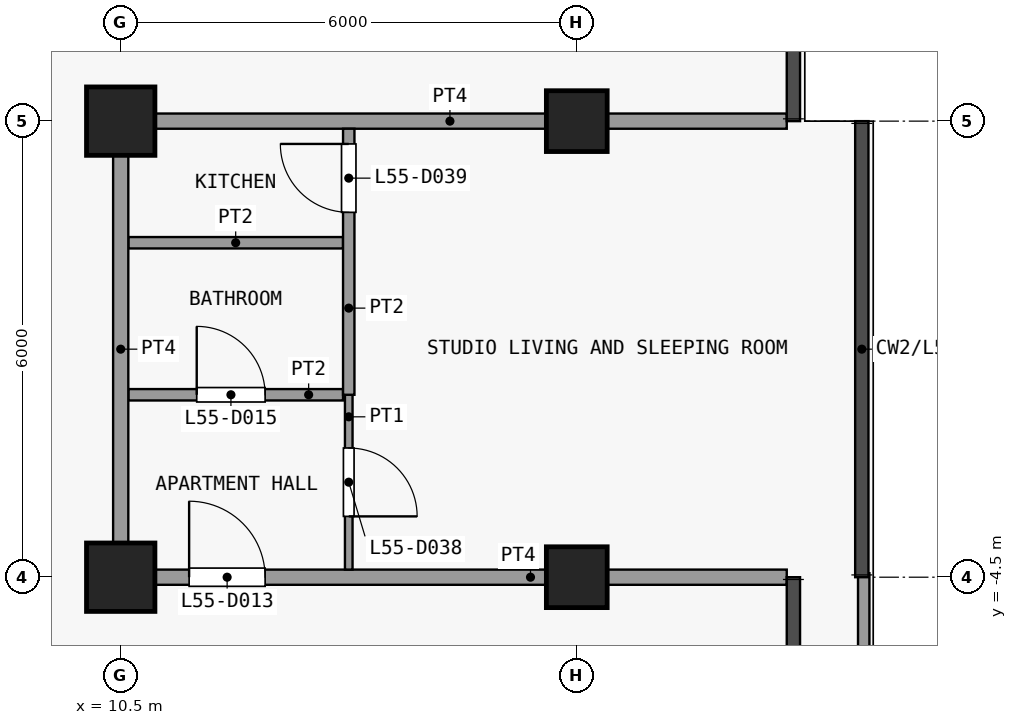
"""IFC4 building model, lengths in metres.
Left out: names, types, materials, properties, quantities, classifications, styles, units other than length and angle.
Written with IfcOpenShell. Run it as: python <this file> out.ifc"""

import sys

from ifc_helpers import new_model, si_unit, direction, frame, frame_2d, origin, origin_2d, place, context, subcontext, project, spatial, rectangle, extrude, element, fill, save


model = new_model("IFC4")
c1 = context("Model", 3, precision=1e-05, world=origin(), true_north=direction((0.0, 1.0)))
c2 = subcontext(c1, "Body", "Model", "MODEL_VIEW")
j1 = project(units=[si_unit("LENGTHUNIT", "METRE"), si_unit("PLANEANGLEUNIT", "RADIAN")], contexts=[c1])
p1 = place(None, origin())
s1 = spatial("IfcSite", under=j1, at=p1, CompositionType="ELEMENT")
p2 = place(p1, origin())
s2 = spatial("IfcBuilding", under=s1, at=p2, CompositionType="ELEMENT")
p3 = place(p2, frame((0.0, 0.0, 219.5)))
s3 = spatial("IfcBuildingStorey", under=s2, at=p3, CompositionType="ELEMENT", Elevation=219.5)
for number, where, z_axis, x_axis in (
    (1, (10.5, -4.5, 0.0), (0.0, 0.0, 1.0), (1.0, 0.0, 0.0)),
    (2, (10.5, 1.5, 0.0), (0.0, 0.0, 1.0), (1.0, 0.0, 0.0)),
):
    element("IfcColumn", number, at=place(p3, frame(where, z_axis=z_axis, x_axis=x_axis)), inside=s3, PredefinedType="COLUMN", context=c2, shape_type="SweptSolid", body=[
        extrude(rectangle(XDim=0.9, YDim=0.9, at=origin_2d()), origin(), (0.0, 0.0, 1.0), 3.6),
    ])
for number, where, z_axis, x_axis in (
    (3, (16.5, -4.5, 0.0), (0.0, 0.0, 1.0), (1.0, 0.0, 0.0)),
    (4, (16.5, 1.5, 0.0), (0.0, 0.0, 1.0), (1.0, 0.0, 0.0)),
):
    element("IfcColumn", number, at=place(p3, frame(where, z_axis=z_axis, x_axis=x_axis)), inside=s3, PredefinedType="COLUMN", context=c2, shape_type="SweptSolid", body=[
        extrude(rectangle(XDim=0.8, YDim=0.8, at=origin_2d()), origin(), (0.0, 0.0, 1.0), 3.6),
    ])
p4 = place(p3, frame((20.275, -4.448, 0.0), z_axis=(0.0, 0.0, 1.0), x_axis=(0.0, -1.0, 0.0)))
e5 = element("IfcWall", 5, at=p4, inside=s3, PredefinedType="PARAPET", context=c2, shape_type="SweptSolid", body=[
    extrude(rectangle(XDim=9.002, YDim=0.15, at=frame_2d((4.501, 0.0))), origin(), (0.0, 0.0, 1.0), 1.15),
])
p5 = place(p3, frame((10.4, -4.5, 0.0), z_axis=(0.0, 0.0, 1.0), x_axis=(1.0, 0.0, 0.0)))
e6 = element("IfcWall", 6, at=p5, inside=s3, PredefinedType="PARTITIONING", context=c2, shape_type="SweptSolid", body=[
    extrude(rectangle(XDim=8.863, YDim=0.2, at=frame_2d((4.431, 0.0))), origin(), (0.0, 0.0, 1.0), 3.3),
])
p6 = place(p5, frame((1.0, 0.0, 0.0)))
e7 = element("IfcOpeningElement", 7, at=p6, cuts=e6, PredefinedType="OPENING", context=c2, shape_type="SweptSolid", body=[
    extrude(rectangle(XDim=1.0, YDim=2.1, at=frame_2d((0.5, 1.05))), frame((0.0, 0.11, 0.0), z_axis=(0.0, -1.0, 0.0), x_axis=(1.0, 0.0, 0.0)), (0.0, 0.0, 1.0), 0.22),
])
p7 = place(p3, frame((10.6, -2.1, 0.0), z_axis=(0.0, 0.0, 1.0), x_axis=(1.0, 0.0, 0.0)))
e8 = element("IfcWall", 8, at=p7, inside=s3, PredefinedType="PARTITIONING", context=c2, shape_type="SweptSolid", body=[
    extrude(rectangle(XDim=2.825, YDim=0.15, at=frame_2d((1.413, 0.0))), origin(), (0.0, 0.0, 1.0), 3.3),
])
p8 = place(p7, frame((0.9, 0.0, 0.0)))
e9 = element("IfcOpeningElement", 9, at=p8, cuts=e8, PredefinedType="OPENING", context=c2, shape_type="SweptSolid", body=[
    extrude(rectangle(XDim=0.9, YDim=2.1, at=frame_2d((0.45, 1.05))), frame((0.0, 0.085, 0.0), z_axis=(0.0, -1.0, 0.0), x_axis=(1.0, 0.0, 0.0)), (0.0, 0.0, 1.0), 0.17),
])
p9 = place(p3, frame((10.6, -0.1, 0.0), z_axis=(0.0, 0.0, 1.0), x_axis=(1.0, 0.0, 0.0)))
e10 = element("IfcWall", 10, at=p9, inside=s3, PredefinedType="PARTITIONING", context=c2, shape_type="SweptSolid", body=[
    extrude(rectangle(XDim=2.825, YDim=0.15, at=frame_2d((1.413, 0.0))), origin(), (0.0, 0.0, 1.0), 3.3),
])
p10 = place(p3, frame((10.4, 1.5, 0.0), z_axis=(0.0, 0.0, 1.0), x_axis=(1.0, 0.0, 0.0)))
e11 = element("IfcWall", 11, at=p10, inside=s3, PredefinedType="PARTITIONING", context=c2, shape_type="SweptSolid", body=[
    extrude(rectangle(XDim=8.863, YDim=0.2, at=frame_2d((4.431, 0.0))), origin(), (0.0, 0.0, 1.0), 3.3),
])
p11 = place(p3, frame((10.5, -4.4, 0.0), z_axis=(0.0, 0.0, 1.0), x_axis=(0.0, 1.0, 0.0)))
e12 = element("IfcWall", 12, at=p11, inside=s3, PredefinedType="PARTITIONING", context=c2, shape_type="SweptSolid", body=[
    extrude(rectangle(XDim=5.8, YDim=0.2, at=frame_2d((2.9, 0.0))), origin(), (0.0, 0.0, 1.0), 3.3),
])
p12 = place(p3, frame((13.5, -4.4, 0.0), z_axis=(0.0, 0.0, 1.0), x_axis=(0.0, 1.0, 0.0)))
e13 = element("IfcWall", 13, at=p12, inside=s3, PredefinedType="PARTITIONING", context=c2, shape_type="SweptSolid", body=[
    extrude(rectangle(XDim=2.3, YDim=0.1, at=frame_2d((1.15, 0.0))), origin(), (0.0, 0.0, 1.0), 3.3),
])
p13 = place(p12, frame((0.7, 0.0, 0.0)))
e14 = element("IfcOpeningElement", 14, at=p13, cuts=e13, PredefinedType="OPENING", context=c2, shape_type="SweptSolid", body=[
    extrude(rectangle(XDim=0.9, YDim=2.1, at=frame_2d((0.45, 1.05))), frame((0.0, 0.06, 0.0), z_axis=(0.0, -1.0, 0.0), x_axis=(1.0, 0.0, 0.0)), (0.0, 0.0, 1.0), 0.12),
])
p14 = place(p3, frame((13.5, -2.1, 0.0), z_axis=(0.0, 0.0, 1.0), x_axis=(0.0, 1.0, 0.0)))
e15 = element("IfcWall", 15, at=p14, inside=s3, PredefinedType="PARTITIONING", context=c2, shape_type="SweptSolid", body=[
    extrude(rectangle(XDim=3.5, YDim=0.15, at=frame_2d((1.75, 0.0))), origin(), (0.0, 0.0, 1.0), 3.3),
])
p15 = place(p14, frame((2.4, 0.0, 0.0)))
e16 = element("IfcOpeningElement", 16, at=p15, cuts=e15, PredefinedType="OPENING", context=c2, shape_type="SweptSolid", body=[
    extrude(rectangle(XDim=0.9, YDim=2.1, at=frame_2d((0.45, 1.05))), frame((0.0, 0.085, 0.0), z_axis=(0.0, -1.0, 0.0), x_axis=(1.0, 0.0, 0.0)), (0.0, 0.0, 1.0), 0.17),
])
p16 = place(p6, origin())
e17 = element("IfcDoor", 17, at=p16, inside=s3, OperationType="SINGLE_SWING_RIGHT", PredefinedType="DOOR", context=c2, shape_type="SweptSolid", body=[
    extrude(rectangle(XDim=1.0, YDim=2.1, at=frame_2d((0.5, 1.05))), frame((0.0, 0.025, 0.0), z_axis=(0.0, -1.0, 0.0), x_axis=(1.0, 0.0, 0.0)), (0.0, 0.0, 1.0), 0.05),
])
fill(e7, e17)
p17 = place(p8, origin())
e18 = element("IfcDoor", 18, at=p17, inside=s3, OperationType="SINGLE_SWING_RIGHT", PredefinedType="DOOR", context=c2, shape_type="SweptSolid", body=[
    extrude(rectangle(XDim=0.9, YDim=2.1, at=frame_2d((0.45, 1.05))), frame((0.0, 0.025, 0.0), z_axis=(0.0, -1.0, 0.0), x_axis=(1.0, 0.0, 0.0)), (0.0, 0.0, 1.0), 0.05),
])
fill(e9, e18)
p18 = place(p13, origin())
e19 = element("IfcDoor", 19, at=p18, inside=s3, OperationType="SINGLE_SWING_LEFT", PredefinedType="DOOR", context=c2, shape_type="SweptSolid", body=[
    extrude(rectangle(XDim=0.9, YDim=2.1, at=frame_2d((0.45, 1.05))), frame((0.0, 0.025, 0.0), z_axis=(0.0, -1.0, 0.0), x_axis=(1.0, 0.0, 0.0)), (0.0, 0.0, 1.0), 0.05),
])
fill(e14, e19)
p19 = place(p15, origin())
e20 = element("IfcDoor", 20, at=p19, inside=s3, OperationType="SINGLE_SWING_LEFT", PredefinedType="DOOR", context=c2, shape_type="SweptSolid", body=[
    extrude(rectangle(XDim=0.9, YDim=2.1, at=frame_2d((0.45, 1.05))), frame((0.0, 0.025, 0.0), z_axis=(0.0, -1.0, 0.0), x_axis=(1.0, 0.0, 0.0)), (0.0, 0.0, 1.0), 0.05),
])
fill(e16, e20)
save(model, sys.argv[1])
